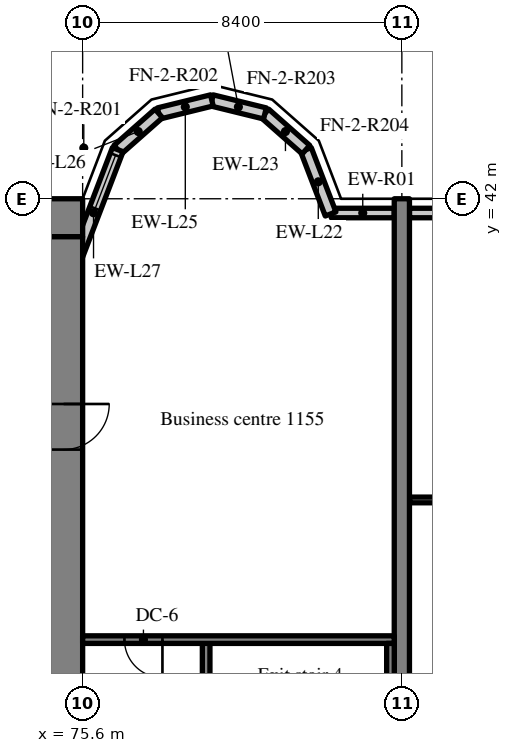
"""IFC4 building model, lengths in metres.
Left out: names, types, materials, properties, quantities, classifications, styles, units other than length and angle.
Written with IfcOpenShell. Run it as: python <this file> out.ifc"""

import sys

from ifc_helpers import new_model, si_unit, direction, frame, frame_2d, origin, place, context, subcontext, project, spatial, rectangle, extrude, source, transform, mapped, element, fill, save


model = new_model("IFC4")
c1 = context("Model", 3, precision=1e-05, world=origin(), true_north=direction((0.0, 1.0)))
c2 = subcontext(c1, "Body", "Model", "MODEL_VIEW")
j1 = project(units=[si_unit("LENGTHUNIT", "METRE"), si_unit("PLANEANGLEUNIT", "RADIAN")], contexts=[c1])
p1 = place(None, origin())
s1 = spatial("IfcSite", under=j1, at=p1, CompositionType="ELEMENT")
p2 = place(p1, origin())
s2 = spatial("IfcBuilding", under=s1, at=p2, CompositionType="ELEMENT")
p3 = place(p2, frame((0.0, 0.0, 50.6)))
s3 = spatial("IfcBuildingStorey", under=s2, at=p3, CompositionType="ELEMENT", Elevation=50.6)
m1 = source(origin(), c2, "Body", "SweptSolid", [
    extrude(rectangle(XDim=50.4, YDim=1.0, at=frame_2d((25.2, 0.0))), origin(), (0.0, 0.0, 1.0), 3.52),
])
p4 = place(p3, frame((25.2, 41.5, 0.0), z_axis=(0.0, 0.0, 1.0), x_axis=(1.0, 0.0, 0.0)))
e1 = element("IfcWall", 1, at=p4, inside=s3, PredefinedType="SHEAR", context=c2, shape_type="MappedRepresentation", body=[
    mapped(m1, transform((0.0, 0.0, 0.0), scale=1.0)),
])
m2 = source(origin(), c2, "Body", "SweptSolid", [
    extrude(rectangle(XDim=18.0, YDim=1.0, at=frame_2d((9.0, 0.0))), origin(), (0.0, 0.0, 1.0), 3.52),
])
p5 = place(p3, frame((75.1, 23.0, 0.0), z_axis=(0.0, 0.0, 1.0), x_axis=(0.0, 1.0, 0.0)))
e2 = element("IfcWall", 2, at=p5, inside=s3, PredefinedType="SHEAR", context=c2, shape_type="MappedRepresentation", body=[
    mapped(m2, transform((0.0, 0.0, 0.0), scale=1.0)),
])
m3 = source(origin(), c2, "Body", "SweptSolid", [
    extrude(rectangle(XDim=1.2, YDim=2.1, at=frame_2d((0.6, 1.05))), frame((0.0, 0.51, 0.0), z_axis=(0.0, -1.0, 0.0), x_axis=(1.0, 0.0, 0.0)), (0.0, 0.0, 1.0), 1.02),
])
p6 = place(p5, frame((12.4, 0.0, 0.0)))
e3 = element("IfcOpeningElement", 3, at=p6, cuts=e2, PredefinedType="OPENING", context=c2, shape_type="MappedRepresentation", body=[
    mapped(m3, transform((0.0, 0.0, 0.0), scale=1.0)),
])
m4 = source(origin(), c2, "Body", "SweptSolid", [
    extrude(rectangle(XDim=20.0, YDim=0.4, at=frame_2d((10.0, 0.0))), origin(), (0.0, 0.0, 1.0), 3.52),
])
p7 = place(p3, frame((84.0, 22.0, 0.0), z_axis=(0.0, 0.0, 1.0), x_axis=(0.0, 1.0, 0.0)))
e4 = element("IfcWall", 4, at=p7, inside=s3, PredefinedType="SHEAR", context=c2, shape_type="MappedRepresentation", body=[
    mapped(m4, transform((0.0, 0.0, 0.0), scale=1.0)),
])
m5 = source(origin(), c2, "Body", "SweptSolid", [
    extrude(rectangle(XDim=1.658, YDim=0.25, at=frame_2d((0.829, 0.0))), origin(), (0.0, 0.0, 1.0), 2.82),
])
p8 = place(p3, frame((83.8, 41.625, 0.0), z_axis=(0.0, 0.0, 1.0), x_axis=(-1.0, 0.0, 0.0)))
e5 = element("IfcWall", 5, at=p8, inside=s3, PredefinedType="SOLIDWALL", context=c2, shape_type="MappedRepresentation", body=[
    mapped(m5, transform((0.0, 0.0, 0.0), scale=1.0)),
])
m6 = source(origin(), c2, "Body", "SweptSolid", [
    extrude(rectangle(XDim=3.6, YDim=0.25, at=frame_2d((1.8, 0.0))), origin(), (0.0, 0.0, 1.0), 2.82),
])
p9 = place(p3, frame((87.8, 41.625, 0.0), z_axis=(0.0, 0.0, 1.0), x_axis=(-1.0, 0.0, 0.0)))
e6 = element("IfcWall", 6, at=p9, inside=s3, PredefinedType="SOLIDWALL", context=c2, shape_type="MappedRepresentation", body=[
    mapped(m6, transform((0.0, 0.0, 0.0), scale=1.0)),
])
m7 = source(origin(), c2, "Body", "SweptSolid", [
    extrude(rectangle(XDim=1.5, YDim=1.5, at=frame_2d((0.75, 0.75))), frame((0.0, 0.135, 0.0), z_axis=(0.0, -1.0, 0.0), x_axis=(1.0, 0.0, 0.0)), (0.0, 0.0, 1.0), 0.27),
])
p10 = place(p9, frame((1.05, 0.0, 0.9)))
e7 = element("IfcOpeningElement", 7, at=p10, cuts=e6, PredefinedType="OPENING", context=c2, shape_type="MappedRepresentation", body=[
    mapped(m7, transform((0.0, 0.0, 0.0), scale=1.0)),
])
m8 = source(origin(), c2, "Body", "SweptSolid", [
    extrude(rectangle(XDim=1.812, YDim=0.3, at=frame_2d((0.906, 0.0))), origin(), (0.0, 0.0, 1.0), 3.52),
])
p11 = place(p3, frame((82.125, 41.6, 0.0), z_axis=(0.0, 0.0, 1.0), x_axis=(-0.357877270961, 0.93376863244, 0.0)))
e8 = element("IfcWall", 8, at=p11, inside=s3, PredefinedType="SOLIDWALL", context=c2, shape_type="MappedRepresentation", body=[
    mapped(m8, transform((0.0, 0.0, 0.0), scale=1.0)),
])
m9 = source(origin(), c2, "Body", "SweptSolid", [
    extrude(rectangle(XDim=1.44, YDim=0.3, at=frame_2d((0.72, 0.0))), origin(), (0.0, 0.0, 1.0), 3.52),
])
p12 = place(p3, frame((81.477, 43.292, 0.0), z_axis=(0.0, 0.0, 1.0), x_axis=(-0.74957555648, 0.661918790432, 0.0)))
e9 = element("IfcWall", 9, at=p12, inside=s3, PredefinedType="SOLIDWALL", context=c2, shape_type="MappedRepresentation", body=[
    mapped(m9, transform((0.0, 0.0, 0.0), scale=1.0)),
])
m10 = source(origin(), c2, "Body", "SweptSolid", [
    extrude(rectangle(XDim=1.439, YDim=0.3, at=frame_2d((0.719, 0.0))), origin(), (0.0, 0.0, 1.0), 3.52),
])
for number, where, z_axis, x_axis in (
    (10, (80.397, 44.245, 0.0), (0.0, 0.0, 1.0), (-0.971, 0.238, 0.0)),
    (11, (79.0, 44.588, 0.0), (0.0, 0.0, 1.0), (-0.971, -0.238, 0.0)),
):
    element("IfcWall", number, at=place(p3, frame(where, z_axis=z_axis, x_axis=x_axis)), inside=s3, PredefinedType="SOLIDWALL", context=c2, shape_type="MappedRepresentation", body=[
        mapped(m10, transform((0.0, 0.0, 0.0), scale=1.0)),
    ])
p13 = place(p3, frame((77.603, 44.245, 0.0), z_axis=(0.0, 0.0, 1.0), x_axis=(-0.74957555648, -0.661918790432, 0.0)))
e12 = element("IfcWall", 12, at=p13, inside=s3, PredefinedType="SOLIDWALL", context=c2, shape_type="MappedRepresentation", body=[
    mapped(m9, transform((0.0, 0.0, 0.0), scale=1.0)),
])
m11 = source(origin(), c2, "Body", "SweptSolid", [
    extrude(rectangle(XDim=3.559, YDim=0.3, at=frame_2d((1.78, 0.0))), origin(), (0.0, 0.0, 1.0), 3.52),
])
p14 = place(p3, frame((76.523, 43.292, 0.0), z_axis=(0.0, 0.0, 1.0), x_axis=(-0.35779745313, -0.933799219604, 0.0)))
e13 = element("IfcWall", 13, at=p14, inside=s3, PredefinedType="SOLIDWALL", context=c2, shape_type="MappedRepresentation", body=[
    mapped(m11, transform((0.0, 0.0, 0.0), scale=1.0)),
])
m12 = source(origin(), c2, "Body", "SweptSolid", [
    extrude(rectangle(XDim=1.5, YDim=2.0, at=frame_2d((0.75, 1.0))), frame((0.0, 0.16, 0.0), z_axis=(0.0, -1.0, 0.0), x_axis=(1.0, 0.0, 0.0)), (0.0, 0.0, 1.0), 0.32),
])
p15 = place(p14, frame((0.156, 0.0, 0.9)))
e14 = element("IfcOpeningElement", 14, at=p15, cuts=e13, PredefinedType="OPENING", context=c2, shape_type="MappedRepresentation", body=[
    mapped(m12, transform((0.0, 0.0, 0.0), scale=1.0)),
])
m13 = source(origin(), c2, "Body", "SweptSolid", [
    extrude(rectangle(XDim=8.3, YDim=0.2, at=frame_2d((4.15, 0.0))), origin(), (0.0, 0.0, 1.0), 3.52),
])
p16 = place(p3, frame((78.85, 22.1, 0.0), z_axis=(0.0, 0.0, 1.0), x_axis=(0.0, 1.0, 0.0)))
e15 = element("IfcWall", 15, at=p16, inside=s3, PredefinedType="SOLIDWALL", context=c2, shape_type="MappedRepresentation", body=[
    mapped(m13, transform((0.0, 0.0, 0.0), scale=1.0)),
])
m14 = source(origin(), c2, "Body", "SweptSolid", [
    extrude(rectangle(XDim=1.2, YDim=2.1, at=frame_2d((0.6, 1.05))), frame((0.0, 0.11, 0.0), z_axis=(0.0, -1.0, 0.0), x_axis=(1.0, 0.0, 0.0)), (0.0, 0.0, 1.0), 0.22),
])
p17 = place(p16, frame((0.6, 0.0, 0.0)))
e16 = element("IfcOpeningElement", 16, at=p17, cuts=e15, PredefinedType="OPENING", context=c2, shape_type="MappedRepresentation", body=[
    mapped(m14, transform((0.0, 0.0, 0.0), scale=1.0)),
])
m15 = source(origin(), c2, "Body", "SweptSolid", [
    extrude(rectangle(XDim=8.2, YDim=0.2, at=frame_2d((4.1, 0.0))), origin(), (0.0, 0.0, 1.0), 3.52),
])
p18 = place(p3, frame((83.8, 30.4, 0.0), z_axis=(0.0, 0.0, 1.0), x_axis=(-1.0, 0.0, 0.0)))
e17 = element("IfcWall", 17, at=p18, inside=s3, PredefinedType="SOLIDWALL", context=c2, shape_type="MappedRepresentation", body=[
    mapped(m15, transform((0.0, 0.0, 0.0), scale=1.0)),
])
m16 = source(origin(), c2, "Body", "SweptSolid", [
    extrude(rectangle(XDim=1.0, YDim=2.1, at=frame_2d((0.5, 1.05))), frame((0.0, 0.11, 0.0), z_axis=(0.0, -1.0, 0.0), x_axis=(1.0, 0.0, 0.0)), (0.0, 0.0, 1.0), 0.22),
])
p19 = place(p18, frame((6.1, 0.0, 0.0)))
e18 = element("IfcOpeningElement", 18, at=p19, cuts=e17, PredefinedType="OPENING", context=c2, shape_type="MappedRepresentation", body=[
    mapped(m16, transform((0.0, 0.0, 0.0), scale=1.0)),
])
m17 = source(origin(), c2, "Body", "SweptSolid", [
    extrude(rectangle(XDim=8.1, YDim=0.2, at=frame_2d((4.05, 0.0))), origin(), (0.0, 0.0, 1.0), 3.52),
])
p20 = place(p3, frame((83.7, 22.2, 0.0), z_axis=(0.0, 0.0, 1.0), x_axis=(0.0, 1.0, 0.0)))
e19 = element("IfcWall", 19, at=p20, inside=s3, PredefinedType="SOLIDWALL", context=c2, shape_type="MappedRepresentation", body=[
    mapped(m17, transform((0.0, 0.0, 0.0), scale=1.0)),
])
m18 = source(origin(), c2, "Body", "SweptSolid", [
    extrude(rectangle(XDim=8.0, YDim=0.15, at=frame_2d((4.0, 0.0))), origin(), (0.0, 0.0, 1.0), 3.52),
])
p21 = place(p3, frame((84.2, 34.075, 0.0), z_axis=(0.0, 0.0, 1.0), x_axis=(1.0, 0.0, 0.0)))
e20 = element("IfcWall", 20, at=p21, inside=s3, PredefinedType="PARTITIONING", context=c2, shape_type="MappedRepresentation", body=[
    mapped(m18, transform((0.0, 0.0, 0.0), scale=1.0)),
])
m19 = source(origin(), c2, "Body", "SweptSolid", [
    extrude(rectangle(XDim=1.0, YDim=2.1, at=frame_2d((0.5, 1.05))), frame((0.0, 0.085, 0.0), z_axis=(0.0, -1.0, 0.0), x_axis=(1.0, 0.0, 0.0)), (0.0, 0.0, 1.0), 0.17),
])
p22 = place(p21, frame((0.7, 0.0, 0.0)))
e21 = element("IfcOpeningElement", 21, at=p22, cuts=e20, PredefinedType="OPENING", context=c2, shape_type="MappedRepresentation", body=[
    mapped(m19, transform((0.0, 0.0, 0.0), scale=1.0)),
])
m20 = source(origin(), c2, "Body", "SweptSolid", [
    extrude(rectangle(XDim=1.5, YDim=2.0, at=frame_2d((0.75, 1.0))), frame((0.0, 0.03, 0.0), z_axis=(0.0, -1.0, 0.0), x_axis=(1.0, 0.0, 0.0)), (0.0, 0.0, 1.0), 0.06),
])
p23 = place(p15, origin())
e22 = element("IfcWindow", 22, at=p23, inside=s3, PartitioningType="SINGLE_PANEL", PredefinedType="WINDOW", context=c2, shape_type="MappedRepresentation", body=[
    mapped(m20, transform((0.0, 0.0, 0.0), scale=1.0)),
])
fill(e14, e22)
m21 = source(origin(), c2, "Body", "SweptSolid", [
    extrude(rectangle(XDim=1.2, YDim=2.1, at=frame_2d((0.6, 1.05))), frame((0.0, 0.025, 0.0), z_axis=(0.0, -1.0, 0.0), x_axis=(1.0, 0.0, 0.0)), (0.0, 0.0, 1.0), 0.05),
])
p24 = place(p6, origin())
e23 = element("IfcDoor", 23, at=p24, inside=s3, OperationType="SINGLE_SWING_RIGHT", PredefinedType="DOOR", context=c2, shape_type="MappedRepresentation", body=[
    mapped(m21, transform((0.0, 0.0, 0.0), scale=1.0)),
])
fill(e3, e23)
m22 = source(origin(), c2, "Body", "SweptSolid", [
    extrude(rectangle(XDim=1.0, YDim=2.1, at=frame_2d((0.5, 1.05))), frame((0.0, 0.025, 0.0), z_axis=(0.0, -1.0, 0.0), x_axis=(1.0, 0.0, 0.0)), (0.0, 0.0, 1.0), 0.05),
])
p25 = place(p19, origin())
e24 = element("IfcDoor", 24, at=p25, inside=s3, OperationType="SINGLE_SWING_LEFT", PredefinedType="DOOR", context=c2, shape_type="MappedRepresentation", body=[
    mapped(m22, transform((0.0, 0.0, 0.0), scale=1.0)),
])
fill(e18, e24)
save(model, sys.argv[1])
